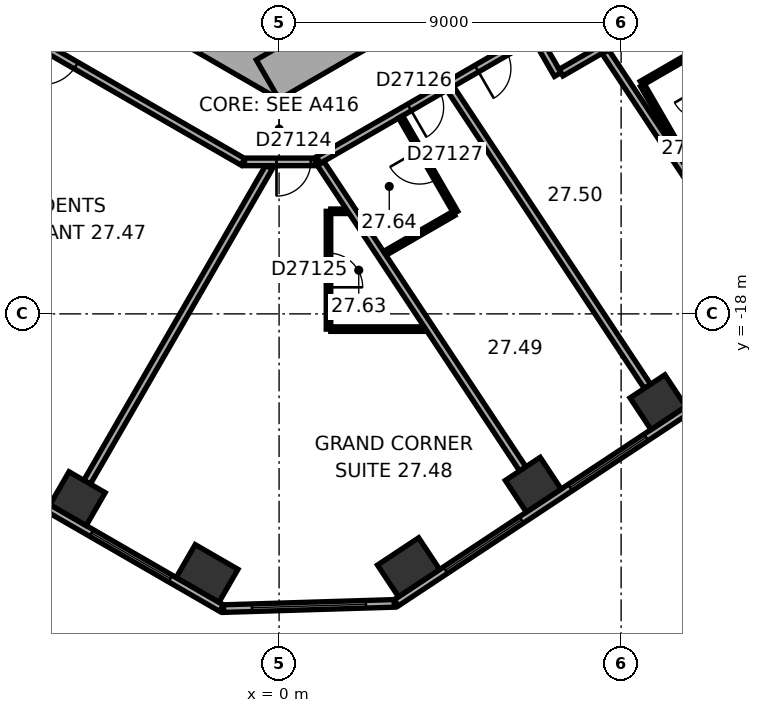
"""IFC4 building model, lengths in metres.
Left out: names, types, materials, properties, quantities, classifications, styles, units other than length and angle.
Written with IfcOpenShell. Run it as: python <this file> out.ifc"""

import sys

from ifc_helpers import new_model, si_unit, direction, frame, frame_2d, origin, origin_2d, place, context, subcontext, project, spatial, rectangle, extrude, element, fill, save


model = new_model("IFC4")
c1 = context("Model", 3, precision=1e-05, world=origin(), true_north=direction((0.0, 1.0)))
c2 = subcontext(c1, "Body", "Model", "MODEL_VIEW")
j1 = project(units=[si_unit("LENGTHUNIT", "METRE"), si_unit("PLANEANGLEUNIT", "RADIAN")], contexts=[c1])
p1 = place(None, origin())
s1 = spatial("IfcSite", under=j1, at=p1, CompositionType="ELEMENT")
p2 = place(p1, origin())
s2 = spatial("IfcBuilding", under=s1, at=p2, CompositionType="ELEMENT")
p3 = place(p2, frame((0.0, 0.0, 113.3)))
s3 = spatial("IfcBuildingStorey", under=s2, at=p3, CompositionType="ELEMENT", Elevation=113.3)
p4 = place(p3, frame((-5.302, -22.862, 0.0), z_axis=(0.0, 0.0, 1.0), x_axis=(0.866025403784, -0.5, 0.0)))
e1 = element("IfcColumn", 1, at=p4, inside=s3, PredefinedType="COLUMN", context=c2, shape_type="SweptSolid", body=[
    extrude(rectangle(XDim=1.1, YDim=1.0, at=origin_2d()), origin(), (0.0, 0.0, 1.0), 3.3),
])
for number, where, z_axis, x_axis in (
    (2, (-1.895, -24.829, 0.0), (0.0, 0.0, 1.0), (0.866, -0.5, 0.0)),
    (3, (3.407, -24.667, 0.0), (0.0, 0.0, 1.0), (0.834, 0.552, 0.0)),
):
    element("IfcColumn", number, at=place(p3, frame(where, z_axis=z_axis, x_axis=x_axis)), inside=s3, PredefinedType="COLUMN", context=c2, shape_type="SweptSolid", body=[
        extrude(rectangle(XDim=1.3, YDim=1.0, at=origin_2d()), origin(), (0.0, 0.0, 1.0), 3.3),
    ])
for number, where, z_axis, x_axis in (
    (4, (6.688, -22.496, 0.0), (0.0, 0.0, 1.0), (0.834, 0.552, 0.0)),
    (5, (9.969, -20.324, 0.0), (0.0, 0.0, 1.0), (0.834, 0.552, 0.0)),
):
    element("IfcColumn", number, at=place(p3, frame(where, z_axis=z_axis, x_axis=x_axis)), inside=s3, PredefinedType="COLUMN", context=c2, shape_type="SweptSolid", body=[
        extrude(rectangle(XDim=1.1, YDim=1.0, at=origin_2d()), origin(), (0.0, 0.0, 1.0), 3.3),
    ])
p5 = place(p3, frame((-10.4, -5.658, 0.0), z_axis=(0.0, 0.0, 1.0), x_axis=(0.866021384402, -0.500006961711, 0.0)))
e6 = element("IfcWall", 6, at=p5, inside=s3, PredefinedType="SHEAR", context=c2, shape_type="SweptSolid", body=[
    extrude(rectangle(XDim=12.355, YDim=1.2, at=frame_2d((6.178, 0.0))), origin(), (0.0, 0.0, 1.0), 3.3),
])
p6 = place(p5, frame((6.378, 0.0, 0.0)))
e7 = element("IfcOpeningElement", 7, at=p6, cuts=e6, PredefinedType="OPENING", context=c2, shape_type="SweptSolid", body=[
    extrude(rectangle(XDim=1.5, YDim=2.1, at=frame_2d((0.75, 1.05))), frame((0.0, 0.61, 0.0), z_axis=(0.0, -1.0, 0.0), x_axis=(1.0, 0.0, 0.0)), (0.0, 0.0, 1.0), 1.22),
])
p7 = place(p5, frame((3.228, 0.0, 0.0)))
e8 = element("IfcOpeningElement", 8, at=p7, cuts=e6, PredefinedType="OPENING", context=c2, shape_type="SweptSolid", body=[
    extrude(rectangle(XDim=0.9, YDim=2.1, at=frame_2d((0.45, 1.05))), frame((0.0, 0.61, 0.0), z_axis=(0.0, -1.0, 0.0), x_axis=(1.0, 0.0, 0.0)), (0.0, 0.0, 1.0), 1.22),
])
p8 = place(p3, frame((-0.3, -11.836, 0.0), z_axis=(0.0, 0.0, 1.0), x_axis=(0.866021384402, 0.500006961711, 0.0)))
e9 = element("IfcWall", 9, at=p8, inside=s3, PredefinedType="SHEAR", context=c2, shape_type="SweptSolid", body=[
    extrude(rectangle(XDim=12.355, YDim=1.2, at=frame_2d((6.178, 0.0))), origin(), (0.0, 0.0, 1.0), 3.3),
])
p9 = place(p8, frame((4.128, 0.0, 0.0)))
e10 = element("IfcOpeningElement", 10, at=p9, cuts=e9, PredefinedType="OPENING", context=c2, shape_type="SweptSolid", body=[
    extrude(rectangle(XDim=0.9, YDim=2.1, at=frame_2d((0.45, 1.05))), frame((0.0, 0.61, 0.0), z_axis=(0.0, -1.0, 0.0), x_axis=(1.0, 0.0, 0.0)), (0.0, 0.0, 1.0), 1.22),
])
p10 = place(p8, frame((7.928, 0.0, 0.0)))
e11 = element("IfcOpeningElement", 11, at=p10, cuts=e9, PredefinedType="OPENING", context=c2, shape_type="SweptSolid", body=[
    extrude(rectangle(XDim=1.1, YDim=2.1, at=frame_2d((0.55, 1.05))), frame((0.0, 0.61, 0.0), z_axis=(0.0, -1.0, 0.0), x_axis=(1.0, 0.0, 0.0)), (0.0, 0.0, 1.0), 1.22),
])
p11 = place(p3, frame((-19.914, -15.119, 0.0), z_axis=(0.0, 0.0, 1.0), x_axis=(0.866025418898, -0.499999973822, 0.0)))
e12 = element("IfcWall", 12, at=p11, inside=s3, PredefinedType="STANDARD", context=c2, shape_type="SweptSolid", body=[
    extrude(rectangle(XDim=21.246, YDim=0.2, at=frame_2d((10.623, 0.0))), origin(), (0.0, 0.0, 1.0), 3.3),
])
p12 = place(p11, frame((1.555, 0.0, 0.8)))
e13 = element("IfcOpeningElement", 13, at=p12, cuts=e12, PredefinedType="OPENING", context=c2, shape_type="SweptSolid", body=[
    extrude(rectangle(XDim=2.4, YDim=1.7, at=frame_2d((1.2, 0.85))), frame((0.0, 0.11, 0.0), z_axis=(0.0, -1.0, 0.0), x_axis=(1.0, 0.0, 0.0)), (0.0, 0.0, 1.0), 0.22),
])
p13 = place(p11, frame((5.489, 0.0, 0.8)))
e14 = element("IfcOpeningElement", 14, at=p13, cuts=e12, PredefinedType="OPENING", context=c2, shape_type="SweptSolid", body=[
    extrude(rectangle(XDim=2.4, YDim=1.7, at=frame_2d((1.2, 0.85))), frame((0.0, 0.11, 0.0), z_axis=(0.0, -1.0, 0.0), x_axis=(1.0, 0.0, 0.0)), (0.0, 0.0, 1.0), 0.22),
])
p14 = place(p11, frame((9.424, 0.0, 0.8)))
e15 = element("IfcOpeningElement", 15, at=p14, cuts=e12, PredefinedType="OPENING", context=c2, shape_type="SweptSolid", body=[
    extrude(rectangle(XDim=2.4, YDim=1.7, at=frame_2d((1.2, 0.85))), frame((0.0, 0.11, 0.0), z_axis=(0.0, -1.0, 0.0), x_axis=(1.0, 0.0, 0.0)), (0.0, 0.0, 1.0), 0.22),
])
p15 = place(p11, frame((13.358, 0.0, 0.8)))
e16 = element("IfcOpeningElement", 16, at=p15, cuts=e12, PredefinedType="OPENING", context=c2, shape_type="SweptSolid", body=[
    extrude(rectangle(XDim=2.4, YDim=1.7, at=frame_2d((1.2, 0.85))), frame((0.0, 0.11, 0.0), z_axis=(0.0, -1.0, 0.0), x_axis=(1.0, 0.0, 0.0)), (0.0, 0.0, 1.0), 0.22),
])
p16 = place(p11, frame((17.293, 0.0, 0.8)))
e17 = element("IfcOpeningElement", 17, at=p16, cuts=e12, PredefinedType="OPENING", context=c2, shape_type="SweptSolid", body=[
    extrude(rectangle(XDim=2.4, YDim=1.7, at=frame_2d((1.2, 0.85))), frame((0.0, 0.11, 0.0), z_axis=(0.0, -1.0, 0.0), x_axis=(1.0, 0.0, 0.0)), (0.0, 0.0, 1.0), 0.22),
])
p17 = place(p3, frame((-1.461, -25.755, 0.0), z_axis=(0.0, 0.0, 1.0), x_axis=(0.999533823446, 0.030530898895, 0.0)))
e18 = element("IfcWall", 18, at=p17, inside=s3, PredefinedType="STANDARD", context=c2, shape_type="SweptSolid", body=[
    extrude(rectangle(XDim=4.494, YDim=0.2, at=frame_2d((2.247, 0.0))), origin(), (0.0, 0.0, 1.0), 3.3),
])
p18 = place(p17, frame((0.747, 0.0, 0.8)))
e19 = element("IfcOpeningElement", 19, at=p18, cuts=e18, PredefinedType="OPENING", context=c2, shape_type="SweptSolid", body=[
    extrude(rectangle(XDim=3.0, YDim=1.7, at=frame_2d((1.5, 0.85))), frame((0.0, 0.11, 0.0), z_axis=(0.0, -1.0, 0.0), x_axis=(1.0, 0.0, 0.0)), (0.0, 0.0, 1.0), 0.22),
])
p19 = place(p3, frame((3.083, -25.601, 0.0), z_axis=(0.0, 0.0, 1.0), x_axis=(0.833884295743, 0.551939291329, 0.0)))
e20 = element("IfcWall", 20, at=p19, inside=s3, PredefinedType="STANDARD", context=c2, shape_type="SweptSolid", body=[
    extrude(rectangle(XDim=21.246, YDim=0.2, at=frame_2d((10.623, 0.0))), origin(), (0.0, 0.0, 1.0), 3.3),
])
p20 = place(p19, frame((1.553, 0.0, 0.8)))
e21 = element("IfcOpeningElement", 21, at=p20, cuts=e20, PredefinedType="OPENING", context=c2, shape_type="SweptSolid", body=[
    extrude(rectangle(XDim=2.4, YDim=1.7, at=frame_2d((1.2, 0.85))), frame((0.0, 0.11, 0.0), z_axis=(0.0, -1.0, 0.0), x_axis=(1.0, 0.0, 0.0)), (0.0, 0.0, 1.0), 0.22),
])
p21 = place(p19, frame((5.488, 0.0, 0.8)))
e22 = element("IfcOpeningElement", 22, at=p21, cuts=e20, PredefinedType="OPENING", context=c2, shape_type="SweptSolid", body=[
    extrude(rectangle(XDim=2.4, YDim=1.7, at=frame_2d((1.2, 0.85))), frame((0.0, 0.11, 0.0), z_axis=(0.0, -1.0, 0.0), x_axis=(1.0, 0.0, 0.0)), (0.0, 0.0, 1.0), 0.22),
])
p22 = place(p19, frame((9.422, 0.0, 0.8)))
e23 = element("IfcOpeningElement", 23, at=p22, cuts=e20, PredefinedType="OPENING", context=c2, shape_type="SweptSolid", body=[
    extrude(rectangle(XDim=2.4, YDim=1.7, at=frame_2d((1.2, 0.85))), frame((0.0, 0.11, 0.0), z_axis=(0.0, -1.0, 0.0), x_axis=(1.0, 0.0, 0.0)), (0.0, 0.0, 1.0), 0.22),
])
p23 = place(p19, frame((13.357, 0.0, 0.8)))
e24 = element("IfcOpeningElement", 24, at=p23, cuts=e20, PredefinedType="OPENING", context=c2, shape_type="SweptSolid", body=[
    extrude(rectangle(XDim=2.4, YDim=1.7, at=frame_2d((1.2, 0.85))), frame((0.0, 0.11, 0.0), z_axis=(0.0, -1.0, 0.0), x_axis=(1.0, 0.0, 0.0)), (0.0, 0.0, 1.0), 0.22),
])
p24 = place(p19, frame((17.291, 0.0, 0.8)))
e25 = element("IfcOpeningElement", 25, at=p24, cuts=e20, PredefinedType="OPENING", context=c2, shape_type="SweptSolid", body=[
    extrude(rectangle(XDim=2.4, YDim=1.7, at=frame_2d((1.2, 0.85))), frame((0.0, 0.11, 0.0), z_axis=(0.0, -1.0, 0.0), x_axis=(1.0, 0.0, 0.0)), (0.0, 0.0, 1.0), 0.22),
])
p25 = place(p3, frame((-11.615, -7.843, 0.0), z_axis=(0.0, 0.0, 1.0), x_axis=(0.866026466995, -0.499998158461, 0.0)))
e26 = element("IfcWall", 26, at=p25, inside=s3, PredefinedType="PARTITIONING", context=c2, shape_type="SweptSolid", body=[
    extrude(rectangle(XDim=12.315, YDim=0.2, at=frame_2d((6.158, 0.0))), origin(), (0.0, 0.0, 1.0), 3.05),
])
p26 = place(p25, frame((6.244, 0.0, 0.0)))
e27 = element("IfcOpeningElement", 27, at=p26, cuts=e26, PredefinedType="OPENING", context=c2, shape_type="SweptSolid", body=[
    extrude(rectangle(XDim=1.0, YDim=2.1, at=frame_2d((0.5, 1.05))), frame((0.0, 0.11, 0.0), z_axis=(0.0, -1.0, 0.0), x_axis=(1.0, 0.0, 0.0)), (0.0, 0.0, 1.0), 0.22),
])
p27 = place(p3, frame((-5.052, -22.429, 0.0), z_axis=(0.0, 0.0, 1.0), x_axis=(0.500004329283, 0.866022904257, 0.0)))
e28 = element("IfcWall", 28, at=p27, inside=s3, PredefinedType="PARTITIONING", context=c2, shape_type="SweptSolid", body=[
    extrude(rectangle(XDim=9.572, YDim=0.2, at=frame_2d((4.786, 0.0))), origin(), (0.0, 0.0, 1.0), 3.05),
])
p28 = place(p3, frame((-0.91, -14.001, 0.0), z_axis=(0.0, 0.0, 1.0), x_axis=(1.0, 0.0, 0.0)))
e29 = element("IfcWall", 29, at=p28, inside=s3, PredefinedType="PARTITIONING", context=c2, shape_type="SweptSolid", body=[
    extrude(rectangle(XDim=1.86, YDim=0.2, at=frame_2d((0.93, 0.0))), origin(), (0.0, 0.0, 1.0), 3.05),
])
p29 = place(p28, frame((0.842, 0.0, 0.0)))
e30 = element("IfcOpeningElement", 30, at=p29, cuts=e29, PredefinedType="OPENING", context=c2, shape_type="SweptSolid", body=[
    extrude(rectangle(XDim=0.9, YDim=2.1, at=frame_2d((0.45, 1.05))), frame((0.0, 0.11, 0.0), z_axis=(0.0, -1.0, 0.0), x_axis=(1.0, 0.0, 0.0)), (0.0, 0.0, 1.0), 0.22),
])
p30 = place(p3, frame((1.033, -13.953, 0.0), z_axis=(0.0, 0.0, 1.0), x_axis=(0.866017531406, 0.500013635111, 0.0)))
e31 = element("IfcWall", 31, at=p30, inside=s3, PredefinedType="PARTITIONING", context=c2, shape_type="SweptSolid", body=[
    extrude(rectangle(XDim=6.58, YDim=0.2, at=frame_2d((3.29, 0.0))), origin(), (0.0, 0.0, 1.0), 3.05),
])
p31 = place(p30, frame((2.767, 0.0, 0.0)))
e32 = element("IfcOpeningElement", 32, at=p31, cuts=e31, PredefinedType="OPENING", context=c2, shape_type="SweptSolid", body=[
    extrude(rectangle(XDim=0.9, YDim=2.1, at=frame_2d((0.45, 1.05))), frame((0.0, 0.11, 0.0), z_axis=(0.0, -1.0, 0.0), x_axis=(1.0, 0.0, 0.0)), (0.0, 0.0, 1.0), 0.22),
])
p32 = place(p30, frame((4.811, 0.0, 0.0)))
e33 = element("IfcOpeningElement", 33, at=p32, cuts=e31, PredefinedType="OPENING", context=c2, shape_type="SweptSolid", body=[
    extrude(rectangle(XDim=0.9, YDim=2.1, at=frame_2d((0.45, 1.05))), frame((0.0, 0.11, 0.0), z_axis=(0.0, -1.0, 0.0), x_axis=(1.0, 0.0, 0.0)), (0.0, 0.0, 1.0), 0.22),
])
p33 = place(p3, frame((1.3, -18.401, 0.0), z_axis=(0.0, 0.0, 1.0), x_axis=(0.0, 1.0, 0.0)))
e34 = element("IfcWall", 34, at=p33, inside=s3, PredefinedType="PARTITIONING", context=c2, shape_type="SweptSolid", body=[
    extrude(rectangle(XDim=3.1, YDim=0.12, at=frame_2d((1.55, 0.0))), origin(), (0.0, 0.0, 1.0), 3.05),
])
p34 = place(p33, frame((1.1, 0.0, 0.0)))
e35 = element("IfcOpeningElement", 35, at=p34, cuts=e34, PredefinedType="OPENING", context=c2, shape_type="SweptSolid", body=[
    extrude(rectangle(XDim=0.9, YDim=2.1, at=frame_2d((0.45, 1.05))), frame((0.0, 0.07, 0.0), z_axis=(0.0, -1.0, 0.0), x_axis=(1.0, 0.0, 0.0)), (0.0, 0.0, 1.0), 0.14),
])
p35 = place(p3, frame((1.36, -15.301, 0.0), z_axis=(0.0, 0.0, 1.0), x_axis=(1.0, 0.0, 0.0)))
e36 = element("IfcWall", 36, at=p35, inside=s3, PredefinedType="PARTITIONING", context=c2, shape_type="SweptSolid", body=[
    extrude(rectangle(XDim=0.416, YDim=0.12, at=frame_2d((0.208, 0.0))), origin(), (0.0, 0.0, 1.0), 3.05),
])
p36 = place(p3, frame((3.198, -12.818, 0.0), z_axis=(0.0, 0.0, 1.0), x_axis=(0.499987231761, -0.866032775405, 0.0)))
e37 = element("IfcWall", 37, at=p36, inside=s3, PredefinedType="PARTITIONING", context=c2, shape_type="SweptSolid", body=[
    extrude(rectangle(XDim=2.9, YDim=0.12, at=frame_2d((1.45, 0.0))), origin(), (0.0, 0.0, 1.0), 3.05),
])
p37 = place(p36, frame((1.0, 0.0, 0.0)))
e38 = element("IfcOpeningElement", 38, at=p37, cuts=e37, PredefinedType="OPENING", context=c2, shape_type="SweptSolid", body=[
    extrude(rectangle(XDim=0.9, YDim=2.1, at=frame_2d((0.45, 1.05))), frame((0.0, 0.07, 0.0), z_axis=(0.0, -1.0, 0.0), x_axis=(1.0, 0.0, 0.0)), (0.0, 0.0, 1.0), 0.14),
])
p38 = place(p3, frame((3.828, -18.401, 0.0), z_axis=(0.0, 0.0, 1.0), x_axis=(-1.0, 0.0, 0.0)))
e39 = element("IfcWall", 39, at=p38, inside=s3, PredefinedType="PARTITIONING", context=c2, shape_type="SweptSolid", body=[
    extrude(rectangle(XDim=2.468, YDim=0.12, at=frame_2d((1.234, 0.0))), origin(), (0.0, 0.0, 1.0), 3.05),
])
p39 = place(p3, frame((4.596, -15.36, 0.0), z_axis=(0.0, 0.0, 1.0), x_axis=(-0.865986006152, -0.500068232493, 0.0)))
e40 = element("IfcWall", 40, at=p39, inside=s3, PredefinedType="PARTITIONING", context=c2, shape_type="SweptSolid", body=[
    extrude(rectangle(XDim=2.098, YDim=0.12, at=frame_2d((1.049, 0.0))), origin(), (0.0, 0.0, 1.0), 3.05),
])
p40 = place(p3, frame((6.412, -22.079, 0.0), z_axis=(0.0, 0.0, 1.0), x_axis=(-0.551919507115, 0.83389739037, 0.0)))
e41 = element("IfcWall", 41, at=p40, inside=s3, PredefinedType="PARTITIONING", context=c2, shape_type="SweptSolid", body=[
    extrude(rectangle(XDim=9.635, YDim=0.2, at=frame_2d((4.817, 0.0))), origin(), (0.0, 0.0, 1.0), 3.05),
])
p41 = place(p3, frame((6.782, -10.749, 0.0), z_axis=(0.0, 0.0, 1.0), x_axis=(0.500074377092, -0.865982457891, 0.0)))
e42 = element("IfcWall", 42, at=p41, inside=s3, PredefinedType="PARTITIONING", context=c2, shape_type="SweptSolid", body=[
    extrude(rectangle(XDim=1.101, YDim=0.2, at=frame_2d((0.55, 0.0))), origin(), (0.0, 0.0, 1.0), 3.05),
])
p42 = place(p3, frame((7.419, -11.653, 0.0), z_axis=(0.0, 0.0, 1.0), x_axis=(0.866038154057, 0.49997791523, 0.0)))
e43 = element("IfcWall", 43, at=p42, inside=s3, PredefinedType="PARTITIONING", context=c2, shape_type="SweptSolid", body=[
    extrude(rectangle(XDim=3.502, YDim=0.2, at=frame_2d((1.751, 0.0))), origin(), (0.0, 0.0, 1.0), 3.05),
])
p43 = place(p3, frame((9.532, -11.934, 0.0), z_axis=(0.0, 0.0, 1.0), x_axis=(0.866034573852, 0.49998411664, 0.0)))
e44 = element("IfcWall", 44, at=p43, inside=s3, PredefinedType="PARTITIONING", context=c2, shape_type="SweptSolid", body=[
    extrude(rectangle(XDim=1.4, YDim=0.12, at=frame_2d((0.7, 0.0))), origin(), (0.0, 0.0, 1.0), 3.05),
])
p44 = place(p3, frame((9.693, -19.907, 0.0), z_axis=(0.0, 0.0, 1.0), x_axis=(-0.551938394837, 0.833884889121, 0.0)))
e45 = element("IfcWall", 45, at=p44, inside=s3, PredefinedType="PARTITIONING", context=c2, shape_type="SweptSolid", body=[
    extrude(rectangle(XDim=9.394, YDim=0.2, at=frame_2d((4.697, 0.0))), origin(), (0.0, 0.0, 1.0), 2.6),
])
p45 = place(p3, frame((10.833, -14.185, 0.0), z_axis=(0.0, 0.0, 1.0), x_axis=(-0.500005339912, 0.866022320763, 0.0)))
e46 = element("IfcWall", 46, at=p45, inside=s3, PredefinedType="PARTITIONING", context=c2, shape_type="SweptSolid", body=[
    extrude(rectangle(XDim=2.54, YDim=0.12, at=frame_2d((1.27, 0.0))), origin(), (0.0, 0.0, 1.0), 3.05),
])
p46 = place(p3, frame((12.974, -17.735, 0.0), z_axis=(0.0, 0.0, 1.0), x_axis=(-0.55192625685, 0.833892922982, 0.0)))
e47 = element("IfcWall", 47, at=p46, inside=s3, PredefinedType="PARTITIONING", context=c2, shape_type="SweptSolid", body=[
    extrude(rectangle(XDim=7.95, YDim=0.2, at=frame_2d((3.975, 0.0))), origin(), (0.0, 0.0, 1.0), 3.05),
])
p47 = place(p16, origin())
e48 = element("IfcWindow", 48, at=p47, inside=s3, PartitioningType="SINGLE_PANEL", PredefinedType="WINDOW", context=c2, shape_type="SweptSolid", body=[
    extrude(rectangle(XDim=2.4, YDim=1.7, at=frame_2d((1.2, 0.85))), frame((0.0, 0.03, 0.0), z_axis=(0.0, -1.0, 0.0), x_axis=(1.0, 0.0, 0.0)), (0.0, 0.0, 1.0), 0.06),
])
fill(e17, e48)
p48 = place(p18, origin())
e49 = element("IfcWindow", 49, at=p48, inside=s3, PartitioningType="SINGLE_PANEL", PredefinedType="WINDOW", context=c2, shape_type="SweptSolid", body=[
    extrude(rectangle(XDim=3.0, YDim=1.7, at=frame_2d((1.5, 0.85))), frame((0.0, 0.03, 0.0), z_axis=(0.0, -1.0, 0.0), x_axis=(1.0, 0.0, 0.0)), (0.0, 0.0, 1.0), 0.06),
])
fill(e19, e49)
p49 = place(p20, origin())
e50 = element("IfcWindow", 50, at=p49, inside=s3, PartitioningType="SINGLE_PANEL", PredefinedType="WINDOW", context=c2, shape_type="SweptSolid", body=[
    extrude(rectangle(XDim=2.4, YDim=1.7, at=frame_2d((1.2, 0.85))), frame((0.0, 0.03, 0.0), z_axis=(0.0, -1.0, 0.0), x_axis=(1.0, 0.0, 0.0)), (0.0, 0.0, 1.0), 0.06),
])
fill(e21, e50)
p50 = place(p21, origin())
e51 = element("IfcWindow", 51, at=p50, inside=s3, PartitioningType="SINGLE_PANEL", PredefinedType="WINDOW", context=c2, shape_type="SweptSolid", body=[
    extrude(rectangle(XDim=2.4, YDim=1.7, at=frame_2d((1.2, 0.85))), frame((0.0, 0.03, 0.0), z_axis=(0.0, -1.0, 0.0), x_axis=(1.0, 0.0, 0.0)), (0.0, 0.0, 1.0), 0.06),
])
fill(e22, e51)
p51 = place(p26, origin())
e52 = element("IfcDoor", 52, at=p51, inside=s3, OperationType="SINGLE_SWING_LEFT", PredefinedType="DOOR", context=c2, shape_type="SweptSolid", body=[
    extrude(rectangle(XDim=1.0, YDim=2.1, at=frame_2d((0.5, 1.05))), frame((0.0, 0.025, 0.0), z_axis=(0.0, -1.0, 0.0), x_axis=(1.0, 0.0, 0.0)), (0.0, 0.0, 1.0), 0.05),
])
fill(e27, e52)
p52 = place(p29, origin())
e53 = element("IfcDoor", 53, at=p52, inside=s3, OperationType="SINGLE_SWING_LEFT", PredefinedType="DOOR", context=c2, shape_type="SweptSolid", body=[
    extrude(rectangle(XDim=0.9, YDim=2.1, at=frame_2d((0.45, 1.05))), frame((0.0, 0.025, 0.0), z_axis=(0.0, -1.0, 0.0), x_axis=(1.0, 0.0, 0.0)), (0.0, 0.0, 1.0), 0.05),
])
fill(e30, e53)
p53 = place(p34, origin())
e54 = element("IfcDoor", 54, at=p53, inside=s3, OperationType="SINGLE_SWING_LEFT", PredefinedType="DOOR", context=c2, shape_type="SweptSolid", body=[
    extrude(rectangle(XDim=0.9, YDim=2.1, at=frame_2d((0.45, 1.05))), frame((0.0, 0.025, 0.0), z_axis=(0.0, -1.0, 0.0), x_axis=(1.0, 0.0, 0.0)), (0.0, 0.0, 1.0), 0.05),
])
fill(e35, e54)
p54 = place(p31, origin())
e55 = element("IfcDoor", 55, at=p54, inside=s3, OperationType="SINGLE_SWING_LEFT", PredefinedType="DOOR", context=c2, shape_type="SweptSolid", body=[
    extrude(rectangle(XDim=0.9, YDim=2.1, at=frame_2d((0.45, 1.05))), frame((0.0, 0.025, 0.0), z_axis=(0.0, -1.0, 0.0), x_axis=(1.0, 0.0, 0.0)), (0.0, 0.0, 1.0), 0.05),
])
fill(e32, e55)
p55 = place(p37, origin())
e56 = element("IfcDoor", 56, at=p55, inside=s3, OperationType="SINGLE_SWING_LEFT", PredefinedType="DOOR", context=c2, shape_type="SweptSolid", body=[
    extrude(rectangle(XDim=0.9, YDim=2.1, at=frame_2d((0.45, 1.05))), frame((0.0, 0.025, 0.0), z_axis=(0.0, -1.0, 0.0), x_axis=(1.0, 0.0, 0.0)), (0.0, 0.0, 1.0), 0.05),
])
fill(e38, e56)
p56 = place(p32, origin())
e57 = element("IfcDoor", 57, at=p56, inside=s3, OperationType="SINGLE_SWING_LEFT", PredefinedType="DOOR", context=c2, shape_type="SweptSolid", body=[
    extrude(rectangle(XDim=0.9, YDim=2.1, at=frame_2d((0.45, 1.05))), frame((0.0, 0.025, 0.0), z_axis=(0.0, -1.0, 0.0), x_axis=(1.0, 0.0, 0.0)), (0.0, 0.0, 1.0), 0.05),
])
fill(e33, e57)
save(model, sys.argv[1])
